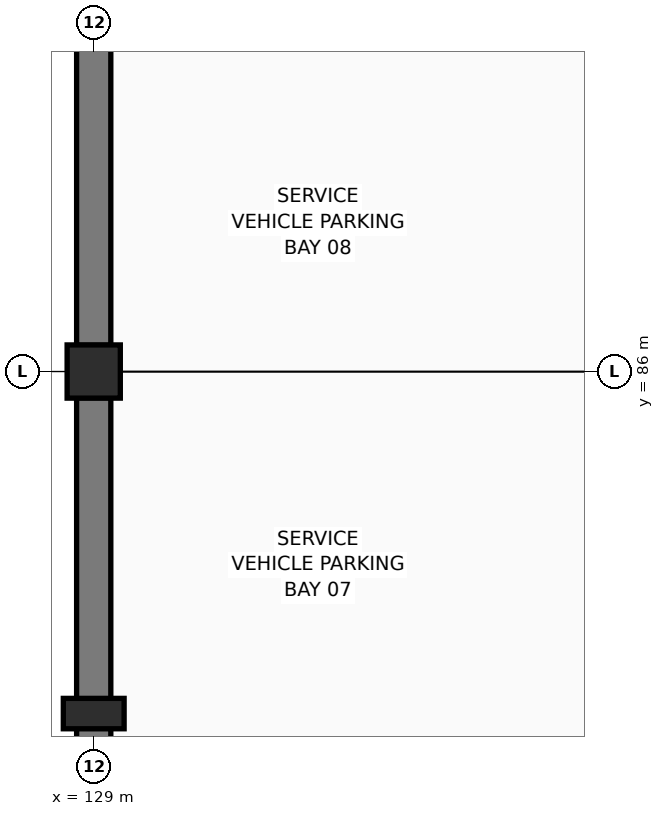
"""IFC4 building model, lengths in metres.
Left out: names, types, materials, properties, quantities, classifications, styles, units other than length and angle.
Written with IfcOpenShell. Run it as: python <this file> out.ifc"""

import sys

from ifc_helpers import new_model, si_unit, direction, frame, frame_2d, origin, origin_2d, place, context, subcontext, project, spatial, rectangle, extrude, element, save


model = new_model("IFC4")
c1 = context("Model", 3, precision=1e-05, world=origin(), true_north=direction((0.0, 1.0)))
c2 = subcontext(c1, "Body", "Model", "MODEL_VIEW")
j1 = project(units=[si_unit("LENGTHUNIT", "METRE"), si_unit("PLANEANGLEUNIT", "RADIAN")], contexts=[c1])
p1 = place(None, origin())
s1 = spatial("IfcSite", under=j1, at=p1, CompositionType="ELEMENT")
p2 = place(p1, origin())
s2 = spatial("IfcBuilding", under=s1, at=p2, CompositionType="ELEMENT")
p3 = place(p2, frame((0.0, 0.0, -4.5)))
s3 = spatial("IfcBuildingStorey", under=s2, at=p3, CompositionType="ELEMENT", Elevation=-4.5)
p4 = place(p3, frame((129.0, 86.0, 0.0), z_axis=(0.0, 0.0, 1.0), x_axis=(1.0, 0.0, 0.0)))
e1 = element("IfcColumn", 1, at=p4, inside=s3, PredefinedType="COLUMN", context=c2, shape_type="SweptSolid", body=[
    extrude(rectangle(XDim=0.7, YDim=0.7, at=origin_2d()), origin(), (0.0, 0.0, 1.0), 4.5),
])
p5 = place(p3, frame((129.0, 81.5, 0.0), z_axis=(0.0, 0.0, 1.0), x_axis=(0.0, 1.0, 0.0)))
e2 = element("IfcColumn", 2, at=p5, inside=s3, PredefinedType="PILASTER", context=c2, shape_type="SweptSolid", body=[
    extrude(rectangle(XDim=0.4, YDim=0.8, at=origin_2d()), origin(), (0.0, 0.0, 1.0), 4.5),
])
for number, where, z_axis, x_axis in (
    (3, (129.0, 90.305, 0.0), (0.0, 0.0, 1.0), (0.0, -1.0, 0.0)),
    (4, (129.0, 85.655, 0.0), (0.0, 0.0, 1.0), (0.0, -1.0, 0.0)),
    (5, (129.0, 81.305, 0.0), (0.0, 0.0, 1.0), (0.0, -1.0, 0.0)),
):
    element("IfcWall", number, at=place(p3, frame(where, z_axis=z_axis, x_axis=x_axis)), inside=s3, PredefinedType="USERDEFINED", context=c2, shape_type="SweptSolid", body=[
        extrude(rectangle(XDim=3.96, YDim=0.45, at=frame_2d((1.98, 0.0))), origin(), (0.0, 0.0, 1.0), 3.775),
    ])
save(model, sys.argv[1])
